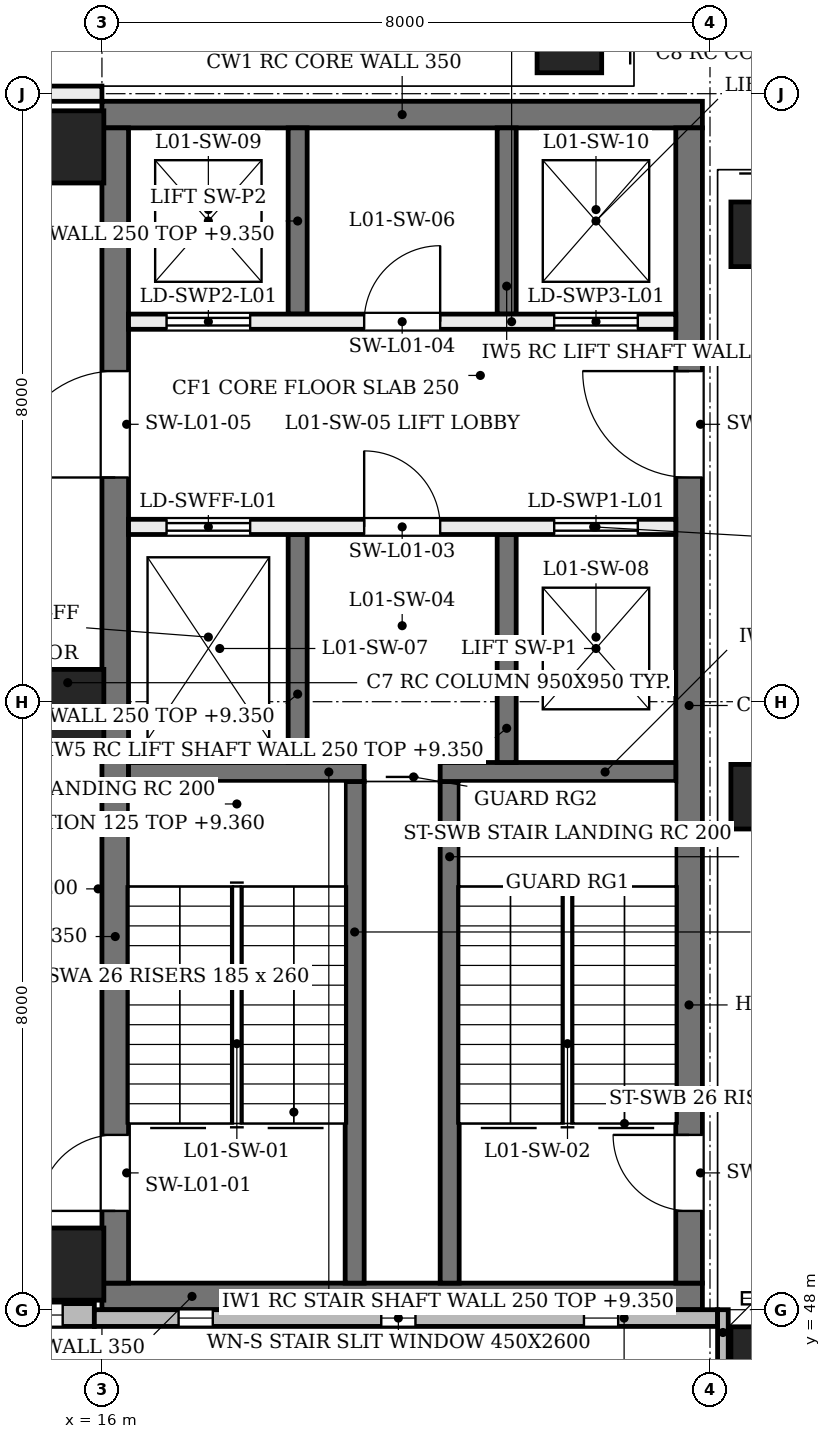
"""IFC4 building model, lengths in metres.
Left out: names, types, materials, properties, quantities, classifications, styles, units other than length and angle.
Written with IfcOpenShell. Run it as: python <this file> out.ifc"""

import sys

from ifc_helpers import new_model, si_unit, direction, frame, frame_2d, origin, origin_2d, place, context, subcontext, project, spatial, rectangle, extrude, element, fill, save


model = new_model("IFC4")
c1 = context("Model", 3, precision=1e-05, world=origin(), true_north=direction((0.0, 1.0)))
c2 = subcontext(c1, "Body", "Model", "MODEL_VIEW")
j1 = project(units=[si_unit("LENGTHUNIT", "METRE"), si_unit("PLANEANGLEUNIT", "RADIAN")], contexts=[c1])
p1 = place(None, origin())
s1 = spatial("IfcSite", under=j1, at=p1, CompositionType="ELEMENT")
p2 = place(p1, origin())
s2 = spatial("IfcBuilding", under=s1, at=p2, CompositionType="ELEMENT")
p3 = place(p2, frame((0.0, 0.0, 4.8)))
s3 = spatial("IfcBuildingStorey", under=s2, at=p3, CompositionType="ELEMENT", Elevation=4.8)
for number, where, z_axis, x_axis in (
    (1, (16.0, 48.175, 0.0), (0.0, 0.0, 1.0), (1.0, 0.0, 0.0)),
    (2, (16.0, 63.725, 0.0), (0.0, 0.0, 1.0), (1.0, 0.0, 0.0)),
):
    element("IfcWall", number, at=place(p3, frame(where, z_axis=z_axis, x_axis=x_axis)), inside=s3, PredefinedType="SHEAR", context=c2, shape_type="SweptSolid", body=[
        extrude(rectangle(XDim=7.9, YDim=0.35, at=frame_2d((3.95, 0.0))), origin(), (0.0, 0.0, 1.0), 4.58),
    ])
p4 = place(p3, frame((16.175, 48.35, 0.0), z_axis=(0.0, 0.0, 1.0), x_axis=(0.0, 1.0, 0.0)))
e3 = element("IfcWall", 3, at=p4, inside=s3, PredefinedType="SHEAR", context=c2, shape_type="SweptSolid", body=[
    extrude(rectangle(XDim=15.2, YDim=0.35, at=frame_2d((7.6, 0.0))), origin(), (0.0, 0.0, 1.0), 4.58),
])
p5 = place(p4, frame((0.95, 0.0, 0.0)))
e4 = element("IfcOpeningElement", 4, at=p5, cuts=e3, PredefinedType="OPENING", context=c2, shape_type="SweptSolid", body=[
    extrude(rectangle(XDim=1.0, YDim=2.1, at=frame_2d((0.5, 1.05))), frame((0.0, 0.185, 0.0), z_axis=(0.0, -1.0, 0.0), x_axis=(1.0, 0.0, 0.0)), (0.0, 0.0, 1.0), 0.37),
])
p6 = place(p4, frame((10.6, 0.0, 0.0)))
e5 = element("IfcOpeningElement", 5, at=p6, cuts=e3, PredefinedType="OPENING", context=c2, shape_type="SweptSolid", body=[
    extrude(rectangle(XDim=1.4, YDim=2.1, at=frame_2d((0.7, 1.05))), frame((0.0, 0.185, 0.0), z_axis=(0.0, -1.0, 0.0), x_axis=(1.0, 0.0, 0.0)), (0.0, 0.0, 1.0), 0.37),
])
p7 = place(p3, frame((23.725, 48.35, 0.0), z_axis=(0.0, 0.0, 1.0), x_axis=(0.0, 1.0, 0.0)))
e6 = element("IfcWall", 6, at=p7, inside=s3, PredefinedType="SHEAR", context=c2, shape_type="SweptSolid", body=[
    extrude(rectangle(XDim=15.2, YDim=0.35, at=frame_2d((7.6, 0.0))), origin(), (0.0, 0.0, 1.0), 4.58),
])
p8 = place(p7, frame((0.95, 0.0, 0.0)))
e7 = element("IfcOpeningElement", 7, at=p8, cuts=e6, PredefinedType="OPENING", context=c2, shape_type="SweptSolid", body=[
    extrude(rectangle(XDim=1.0, YDim=2.1, at=frame_2d((0.5, 1.05))), frame((0.0, 0.185, 0.0), z_axis=(0.0, -1.0, 0.0), x_axis=(1.0, 0.0, 0.0)), (0.0, 0.0, 1.0), 0.37),
])
p9 = place(p7, frame((10.6, 0.0, 0.0)))
e8 = element("IfcOpeningElement", 8, at=p9, cuts=e6, PredefinedType="OPENING", context=c2, shape_type="SweptSolid", body=[
    extrude(rectangle(XDim=1.4, YDim=2.1, at=frame_2d((0.7, 1.05))), frame((0.0, 0.185, 0.0), z_axis=(0.0, -1.0, 0.0), x_axis=(1.0, 0.0, 0.0)), (0.0, 0.0, 1.0), 0.37),
])
for number, where, z_axis, x_axis in (
    (9, (15.55, 48.6, 0.0), (0.0, 0.0, 1.0), (1.0, 0.0, 0.0)),
    (10, (15.55, 55.95, 0.0), (0.0, 0.0, 1.0), (1.0, 0.0, 0.0)),
    (11, (15.55, 63.3, 0.0), (0.0, 0.0, 1.0), (1.0, 0.0, 0.0)),
):
    element("IfcColumn", number, at=place(p3, frame(where, z_axis=z_axis, x_axis=x_axis)), inside=s3, PredefinedType="COLUMN", context=c2, shape_type="SweptSolid", body=[
        extrude(rectangle(XDim=0.95, YDim=0.95, at=origin_2d()), origin(), (0.0, 0.0, 1.0), 4.8),
    ])
for number, where, z_axis, x_axis in (
    (12, (24.7, 47.6, 0.0), (0.0, -0.204, 0.979), (1.0, 0.0, 0.0)),
    (13, (24.7, 55.0, 0.0), (0.0, -0.204, 0.979), (1.0, 0.0, 0.0)),
    (14, (24.7, 62.4, 0.0), (0.0, -0.204, 0.979), (1.0, 0.0, 0.0)),
    (15, (15.0, 64.7, 0.0), (-0.204, 0.0, 0.979), (0.0, -1.0, 0.0)),
    (16, (22.4, 64.7, 0.0), (-0.204, 0.0, 0.979), (0.0, -1.0, 0.0)),
):
    element("IfcColumn", number, at=place(p3, frame(where, z_axis=z_axis, x_axis=x_axis)), inside=s3, PredefinedType="COLUMN", context=c2, shape_type="SweptSolid", body=[
        extrude(rectangle(XDim=0.85, YDim=0.85, at=origin_2d()), origin(), (0.0, 0.0, 1.0), 4.903),
    ])
p10 = place(p3, frame((8.0, 47.93, 0.0), z_axis=(0.0, 0.0, 1.0), x_axis=(1.0, 0.0, 0.0)))
e17 = element("IfcWall", 17, at=p10, inside=s3, PredefinedType="SOLIDWALL", context=c2, shape_type="SweptSolid", body=[
    extrude(rectangle(XDim=7.9, YDim=0.3, at=frame_2d((3.95, 0.0))), origin(), (0.0, 0.0, 1.0), 3.9),
])
p11 = place(p10, frame((0.417, 0.0, 0.75)))
e18 = element("IfcOpeningElement", 18, at=p11, cuts=e17, PredefinedType="OPENING", context=c2, shape_type="SweptSolid", body=[
    extrude(rectangle(XDim=1.8, YDim=3.1, at=frame_2d((0.9, 1.55))), frame((0.0, 0.16, 0.0), z_axis=(0.0, -1.0, 0.0), x_axis=(1.0, 0.0, 0.0)), (0.0, 0.0, 1.0), 0.32),
])
p12 = place(p10, frame((3.05, 0.0, 0.75)))
e19 = element("IfcOpeningElement", 19, at=p12, cuts=e17, PredefinedType="OPENING", context=c2, shape_type="SweptSolid", body=[
    extrude(rectangle(XDim=1.8, YDim=3.1, at=frame_2d((0.9, 1.55))), frame((0.0, 0.16, 0.0), z_axis=(0.0, -1.0, 0.0), x_axis=(1.0, 0.0, 0.0)), (0.0, 0.0, 1.0), 0.32),
])
p13 = place(p10, frame((5.683, 0.0, 0.75)))
e20 = element("IfcOpeningElement", 20, at=p13, cuts=e17, PredefinedType="OPENING", context=c2, shape_type="SweptSolid", body=[
    extrude(rectangle(XDim=1.8, YDim=3.1, at=frame_2d((0.9, 1.55))), frame((0.0, 0.16, 0.0), z_axis=(0.0, -1.0, 0.0), x_axis=(1.0, 0.0, 0.0)), (0.0, 0.0, 1.0), 0.32),
])
p14 = place(p3, frame((15.9, 47.89, 0.0), z_axis=(0.0, 0.0, 1.0), x_axis=(1.0, 0.0, 0.0)))
e21 = element("IfcWall", 21, at=p14, inside=s3, PredefinedType="SOLIDWALL", context=c2, shape_type="SweptSolid", body=[
    extrude(rectangle(XDim=8.2, YDim=0.22, at=frame_2d((4.1, 0.0))), origin(), (0.0, 0.0, 1.0), 3.9),
])
p15 = place(p14, frame((1.108, 0.0, 0.9)))
e22 = element("IfcOpeningElement", 22, at=p15, cuts=e21, PredefinedType="OPENING", context=c2, shape_type="SweptSolid", body=[
    extrude(rectangle(XDim=0.45, YDim=2.6, at=frame_2d((0.225, 1.3))), frame((0.0, 0.12, 0.0), z_axis=(0.0, -1.0, 0.0), x_axis=(1.0, 0.0, 0.0)), (0.0, 0.0, 1.0), 0.24),
])
p16 = place(p14, frame((3.775, 0.0, 0.9)))
e23 = element("IfcOpeningElement", 23, at=p16, cuts=e21, PredefinedType="OPENING", context=c2, shape_type="SweptSolid", body=[
    extrude(rectangle(XDim=0.45, YDim=2.6, at=frame_2d((0.225, 1.3))), frame((0.0, 0.12, 0.0), z_axis=(0.0, -1.0, 0.0), x_axis=(1.0, 0.0, 0.0)), (0.0, 0.0, 1.0), 0.24),
])
p17 = place(p14, frame((6.442, 0.0, 0.9)))
e24 = element("IfcOpeningElement", 24, at=p17, cuts=e21, PredefinedType="OPENING", context=c2, shape_type="SweptSolid", body=[
    extrude(rectangle(XDim=0.45, YDim=2.6, at=frame_2d((0.225, 1.3))), frame((0.0, 0.12, 0.0), z_axis=(0.0, -1.0, 0.0), x_axis=(1.0, 0.0, 0.0)), (0.0, 0.0, 1.0), 0.24),
])
p18 = place(p3, frame((24.17, 47.0, 0.0), z_axis=(0.0, 0.0, 1.0), x_axis=(0.0, 1.0, 0.0)))
e25 = element("IfcWall", 25, at=p18, inside=s3, PredefinedType="SOLIDWALL", context=c2, shape_type="SweptSolid", body=[
    extrude(rectangle(XDim=1.0, YDim=0.14, at=frame_2d((0.5, 0.0))), origin(), (0.0, 0.0, 1.0), 3.9),
])
for number, where, z_axis, x_axis in (
    (26, (19.325, 48.35, 0.0), (0.0, 0.0, 1.0), (0.0, 1.0, 0.0)),
    (27, (20.575, 48.35, 0.0), (0.0, 0.0, 1.0), (0.0, 1.0, 0.0)),
):
    element("IfcWall", number, at=place(p3, frame(where, z_axis=z_axis, x_axis=x_axis)), inside=s3, PredefinedType="SOLIDWALL", context=c2, shape_type="SweptSolid", body=[
        extrude(rectangle(XDim=6.6, YDim=0.25, at=frame_2d((3.3, 0.0))), origin(), (0.0, 0.0, 1.0), 4.55),
    ])
p19 = place(p3, frame((16.35, 55.075, 0.0), z_axis=(0.0, 0.0, 1.0), x_axis=(1.0, 0.0, 0.0)))
e28 = element("IfcWall", 28, at=p19, inside=s3, PredefinedType="SOLIDWALL", context=c2, shape_type="SweptSolid", body=[
    extrude(rectangle(XDim=3.1, YDim=0.25, at=frame_2d((1.55, 0.0))), origin(), (0.0, 0.0, 1.0), 4.55),
])
p20 = place(p3, frame((20.45, 55.075, 0.0), z_axis=(0.0, 0.0, 1.0), x_axis=(1.0, 0.0, 0.0)))
e29 = element("IfcWall", 29, at=p20, inside=s3, PredefinedType="SOLIDWALL", context=c2, shape_type="SweptSolid", body=[
    extrude(rectangle(XDim=3.1, YDim=0.25, at=frame_2d((1.55, 0.0))), origin(), (0.0, 0.0, 1.0), 4.55),
])
p21 = place(p3, frame((18.575, 55.2, 0.0), z_axis=(0.0, 0.0, 1.0), x_axis=(0.0, 1.0, 0.0)))
e30 = element("IfcWall", 30, at=p21, inside=s3, PredefinedType="SOLIDWALL", context=c2, shape_type="SweptSolid", body=[
    extrude(rectangle(XDim=3.0, YDim=0.25, at=frame_2d((1.5, 0.0))), origin(), (0.0, 0.0, 1.0), 4.55),
])
p22 = place(p3, frame((18.575, 61.1, 0.0), z_axis=(0.0, 0.0, 1.0), x_axis=(0.0, 1.0, 0.0)))
e31 = element("IfcWall", 31, at=p22, inside=s3, PredefinedType="SOLIDWALL", context=c2, shape_type="SweptSolid", body=[
    extrude(rectangle(XDim=2.45, YDim=0.25, at=frame_2d((1.225, 0.0))), origin(), (0.0, 0.0, 1.0), 4.55),
])
p23 = place(p3, frame((21.325, 55.2, 0.0), z_axis=(0.0, 0.0, 1.0), x_axis=(0.0, 1.0, 0.0)))
e32 = element("IfcWall", 32, at=p23, inside=s3, PredefinedType="SOLIDWALL", context=c2, shape_type="SweptSolid", body=[
    extrude(rectangle(XDim=3.0, YDim=0.25, at=frame_2d((1.5, 0.0))), origin(), (0.0, 0.0, 1.0), 4.55),
])
p24 = place(p3, frame((21.325, 61.1, 0.0), z_axis=(0.0, 0.0, 1.0), x_axis=(0.0, 1.0, 0.0)))
e33 = element("IfcWall", 33, at=p24, inside=s3, PredefinedType="SOLIDWALL", context=c2, shape_type="SweptSolid", body=[
    extrude(rectangle(XDim=2.45, YDim=0.25, at=frame_2d((1.225, 0.0))), origin(), (0.0, 0.0, 1.0), 4.55),
])
p25 = place(p3, frame((16.35, 58.3, 0.0), z_axis=(0.0, 0.0, 1.0), x_axis=(1.0, 0.0, 0.0)))
e34 = element("IfcWall", 34, at=p25, inside=s3, PredefinedType="SOLIDWALL", context=c2, shape_type="SweptSolid", body=[
    extrude(rectangle(XDim=7.2, YDim=0.2, at=frame_2d((3.6, 0.0))), origin(), (0.0, 0.0, 1.0), 4.55),
])
p26 = place(p25, frame((0.5, 0.0, 0.0)))
e35 = element("IfcOpeningElement", 35, at=p26, cuts=e34, PredefinedType="OPENING", context=c2, shape_type="SweptSolid", body=[
    extrude(rectangle(XDim=1.1, YDim=2.1, at=frame_2d((0.55, 1.05))), frame((0.0, 0.11, 0.0), z_axis=(0.0, -1.0, 0.0), x_axis=(1.0, 0.0, 0.0)), (0.0, 0.0, 1.0), 0.22),
])
p27 = place(p25, frame((5.6, 0.0, 0.0)))
e36 = element("IfcOpeningElement", 36, at=p27, cuts=e34, PredefinedType="OPENING", context=c2, shape_type="SweptSolid", body=[
    extrude(rectangle(XDim=1.1, YDim=2.1, at=frame_2d((0.55, 1.05))), frame((0.0, 0.11, 0.0), z_axis=(0.0, -1.0, 0.0), x_axis=(1.0, 0.0, 0.0)), (0.0, 0.0, 1.0), 0.22),
])
p28 = place(p25, frame((3.1, 0.0, 0.0)))
e37 = element("IfcOpeningElement", 37, at=p28, cuts=e34, PredefinedType="OPENING", context=c2, shape_type="SweptSolid", body=[
    extrude(rectangle(XDim=1.0, YDim=2.1, at=frame_2d((0.5, 1.05))), frame((0.0, 0.11, 0.0), z_axis=(0.0, -1.0, 0.0), x_axis=(1.0, 0.0, 0.0)), (0.0, 0.0, 1.0), 0.22),
])
p29 = place(p3, frame((16.35, 61.0, 0.0), z_axis=(0.0, 0.0, 1.0), x_axis=(1.0, 0.0, 0.0)))
e38 = element("IfcWall", 38, at=p29, inside=s3, PredefinedType="SOLIDWALL", context=c2, shape_type="SweptSolid", body=[
    extrude(rectangle(XDim=7.2, YDim=0.2, at=frame_2d((3.6, 0.0))), origin(), (0.0, 0.0, 1.0), 4.55),
])
p30 = place(p29, frame((0.5, 0.0, 0.0)))
e39 = element("IfcOpeningElement", 39, at=p30, cuts=e38, PredefinedType="OPENING", context=c2, shape_type="SweptSolid", body=[
    extrude(rectangle(XDim=1.1, YDim=2.1, at=frame_2d((0.55, 1.05))), frame((0.0, 0.11, 0.0), z_axis=(0.0, -1.0, 0.0), x_axis=(1.0, 0.0, 0.0)), (0.0, 0.0, 1.0), 0.22),
])
p31 = place(p29, frame((5.6, 0.0, 0.0)))
e40 = element("IfcOpeningElement", 40, at=p31, cuts=e38, PredefinedType="OPENING", context=c2, shape_type="SweptSolid", body=[
    extrude(rectangle(XDim=1.1, YDim=2.1, at=frame_2d((0.55, 1.05))), frame((0.0, 0.11, 0.0), z_axis=(0.0, -1.0, 0.0), x_axis=(1.0, 0.0, 0.0)), (0.0, 0.0, 1.0), 0.22),
])
p32 = place(p29, frame((3.1, 0.0, 0.0)))
e41 = element("IfcOpeningElement", 41, at=p32, cuts=e38, PredefinedType="OPENING", context=c2, shape_type="SweptSolid", body=[
    extrude(rectangle(XDim=1.0, YDim=2.1, at=frame_2d((0.5, 1.05))), frame((0.0, 0.11, 0.0), z_axis=(0.0, -1.0, 0.0), x_axis=(1.0, 0.0, 0.0)), (0.0, 0.0, 1.0), 0.22),
])
p33 = place(p3, frame((12.4, 64.0, 0.0), z_axis=(0.0, 0.0, 1.0), x_axis=(1.0, 0.0, 0.0)))
e42 = element("IfcWall", 42, at=p33, inside=s3, PredefinedType="PARTITIONING", context=c2, shape_type="SweptSolid", body=[
    extrude(rectangle(XDim=3.6, YDim=0.2, at=frame_2d((1.8, 0.0))), origin(), (0.0, 0.0, 1.0), 3.88),
])
p34 = place(p33, frame((0.05, 0.0, 0.0)))
e43 = element("IfcOpeningElement", 43, at=p34, cuts=e42, PredefinedType="OPENING", context=c2, shape_type="SweptSolid", body=[
    extrude(rectangle(XDim=1.0, YDim=2.1, at=frame_2d((0.5, 1.05))), frame((0.0, 0.11, 0.0), z_axis=(0.0, -1.0, 0.0), x_axis=(1.0, 0.0, 0.0)), (0.0, 0.0, 1.0), 0.22),
])
p35 = place(p13, origin())
e44 = element("IfcWindow", 44, at=p35, inside=s3, PartitioningType="SINGLE_PANEL", PredefinedType="WINDOW", context=c2, shape_type="SweptSolid", body=[
    extrude(rectangle(XDim=1.8, YDim=3.1, at=frame_2d((0.9, 1.55))), frame((0.0, 0.03, 0.0), z_axis=(0.0, -1.0, 0.0), x_axis=(1.0, 0.0, 0.0)), (0.0, 0.0, 1.0), 0.06),
])
fill(e20, e44)
p36 = place(p15, origin())
e45 = element("IfcWindow", 45, at=p36, inside=s3, PartitioningType="SINGLE_PANEL", PredefinedType="WINDOW", context=c2, shape_type="SweptSolid", body=[
    extrude(rectangle(XDim=0.45, YDim=2.6, at=frame_2d((0.225, 1.3))), frame((0.0, 0.03, 0.0), z_axis=(0.0, -1.0, 0.0), x_axis=(1.0, 0.0, 0.0)), (0.0, 0.0, 1.0), 0.06),
])
fill(e22, e45)
p37 = place(p16, origin())
e46 = element("IfcWindow", 46, at=p37, inside=s3, PartitioningType="SINGLE_PANEL", PredefinedType="WINDOW", context=c2, shape_type="SweptSolid", body=[
    extrude(rectangle(XDim=0.45, YDim=2.6, at=frame_2d((0.225, 1.3))), frame((0.0, 0.03, 0.0), z_axis=(0.0, -1.0, 0.0), x_axis=(1.0, 0.0, 0.0)), (0.0, 0.0, 1.0), 0.06),
])
fill(e23, e46)
p38 = place(p17, origin())
e47 = element("IfcWindow", 47, at=p38, inside=s3, PartitioningType="SINGLE_PANEL", PredefinedType="WINDOW", context=c2, shape_type="SweptSolid", body=[
    extrude(rectangle(XDim=0.45, YDim=2.6, at=frame_2d((0.225, 1.3))), frame((0.0, 0.03, 0.0), z_axis=(0.0, -1.0, 0.0), x_axis=(1.0, 0.0, 0.0)), (0.0, 0.0, 1.0), 0.06),
])
fill(e24, e47)
p39 = place(p5, origin())
e48 = element("IfcDoor", 48, at=p39, inside=s3, OperationType="SINGLE_SWING_LEFT", PredefinedType="DOOR", context=c2, shape_type="SweptSolid", body=[
    extrude(rectangle(XDim=1.0, YDim=2.1, at=frame_2d((0.5, 1.05))), frame((0.0, 0.025, 0.0), z_axis=(0.0, -1.0, 0.0), x_axis=(1.0, 0.0, 0.0)), (0.0, 0.0, 1.0), 0.05),
])
fill(e4, e48)
p40 = place(p8, frame((1.0, 0.0, 0.0), z_axis=(0.0, 0.0, 1.0), x_axis=(-1.0, 0.0, 0.0)))
e49 = element("IfcDoor", 49, at=p40, inside=s3, OperationType="SINGLE_SWING_RIGHT", PredefinedType="DOOR", context=c2, shape_type="SweptSolid", body=[
    extrude(rectangle(XDim=1.0, YDim=2.1, at=frame_2d((0.5, 1.05))), frame((0.0, 0.025, 0.0), z_axis=(0.0, -1.0, 0.0), x_axis=(1.0, 0.0, 0.0)), (0.0, 0.0, 1.0), 0.05),
])
fill(e7, e49)
p41 = place(p26, origin())
e50 = element("IfcDoor", 50, at=p41, inside=s3, OperationType="DOUBLE_DOOR_SLIDING", PredefinedType="DOOR", context=c2, shape_type="SweptSolid", body=[
    extrude(rectangle(XDim=1.1, YDim=2.1, at=frame_2d((0.55, 1.05))), frame((0.0, 0.025, 0.0), z_axis=(0.0, -1.0, 0.0), x_axis=(1.0, 0.0, 0.0)), (0.0, 0.0, 1.0), 0.05),
])
fill(e35, e50)
p42 = place(p27, origin())
e51 = element("IfcDoor", 51, at=p42, inside=s3, OperationType="DOUBLE_DOOR_SLIDING", PredefinedType="DOOR", context=c2, shape_type="SweptSolid", body=[
    extrude(rectangle(XDim=1.1, YDim=2.1, at=frame_2d((0.55, 1.05))), frame((0.0, 0.025, 0.0), z_axis=(0.0, -1.0, 0.0), x_axis=(1.0, 0.0, 0.0)), (0.0, 0.0, 1.0), 0.05),
])
fill(e36, e51)
p43 = place(p30, frame((1.1, 0.0, 0.0), z_axis=(0.0, 0.0, 1.0), x_axis=(-1.0, 0.0, 0.0)))
e52 = element("IfcDoor", 52, at=p43, inside=s3, OperationType="DOUBLE_DOOR_SLIDING", PredefinedType="DOOR", context=c2, shape_type="SweptSolid", body=[
    extrude(rectangle(XDim=1.1, YDim=2.1, at=frame_2d((0.55, 1.05))), frame((0.0, 0.025, 0.0), z_axis=(0.0, -1.0, 0.0), x_axis=(1.0, 0.0, 0.0)), (0.0, 0.0, 1.0), 0.05),
])
fill(e39, e52)
p44 = place(p31, frame((1.1, 0.0, 0.0), z_axis=(0.0, 0.0, 1.0), x_axis=(-1.0, 0.0, 0.0)))
e53 = element("IfcDoor", 53, at=p44, inside=s3, OperationType="DOUBLE_DOOR_SLIDING", PredefinedType="DOOR", context=c2, shape_type="SweptSolid", body=[
    extrude(rectangle(XDim=1.1, YDim=2.1, at=frame_2d((0.55, 1.05))), frame((0.0, 0.025, 0.0), z_axis=(0.0, -1.0, 0.0), x_axis=(1.0, 0.0, 0.0)), (0.0, 0.0, 1.0), 0.05),
])
fill(e40, e53)
p45 = place(p28, origin())
e54 = element("IfcDoor", 54, at=p45, inside=s3, OperationType="SINGLE_SWING_LEFT", PredefinedType="DOOR", context=c2, shape_type="SweptSolid", body=[
    extrude(rectangle(XDim=1.0, YDim=2.1, at=frame_2d((0.5, 1.05))), frame((0.0, 0.025, 0.0), z_axis=(0.0, -1.0, 0.0), x_axis=(1.0, 0.0, 0.0)), (0.0, 0.0, 1.0), 0.05),
])
fill(e37, e54)
p46 = place(p32, frame((1.0, 0.0, 0.0), z_axis=(0.0, 0.0, 1.0), x_axis=(-1.0, 0.0, 0.0)))
e55 = element("IfcDoor", 55, at=p46, inside=s3, OperationType="SINGLE_SWING_RIGHT", PredefinedType="DOOR", context=c2, shape_type="SweptSolid", body=[
    extrude(rectangle(XDim=1.0, YDim=2.1, at=frame_2d((0.5, 1.05))), frame((0.0, 0.025, 0.0), z_axis=(0.0, -1.0, 0.0), x_axis=(1.0, 0.0, 0.0)), (0.0, 0.0, 1.0), 0.05),
])
fill(e41, e55)
p47 = place(p6, origin())
e56 = element("IfcDoor", 56, at=p47, inside=s3, OperationType="SINGLE_SWING_LEFT", PredefinedType="DOOR", context=c2, shape_type="SweptSolid", body=[
    extrude(rectangle(XDim=1.4, YDim=2.1, at=frame_2d((0.7, 1.05))), frame((0.0, 0.025, 0.0), z_axis=(0.0, -1.0, 0.0), x_axis=(1.0, 0.0, 0.0)), (0.0, 0.0, 1.0), 0.05),
])
fill(e5, e56)
p48 = place(p9, frame((1.4, 0.0, 0.0), z_axis=(0.0, 0.0, 1.0), x_axis=(-1.0, 0.0, 0.0)))
e57 = element("IfcDoor", 57, at=p48, inside=s3, OperationType="SINGLE_SWING_RIGHT", PredefinedType="DOOR", context=c2, shape_type="SweptSolid", body=[
    extrude(rectangle(XDim=1.4, YDim=2.1, at=frame_2d((0.7, 1.05))), frame((0.0, 0.025, 0.0), z_axis=(0.0, -1.0, 0.0), x_axis=(1.0, 0.0, 0.0)), (0.0, 0.0, 1.0), 0.05),
])
fill(e8, e57)
save(model, sys.argv[1])
